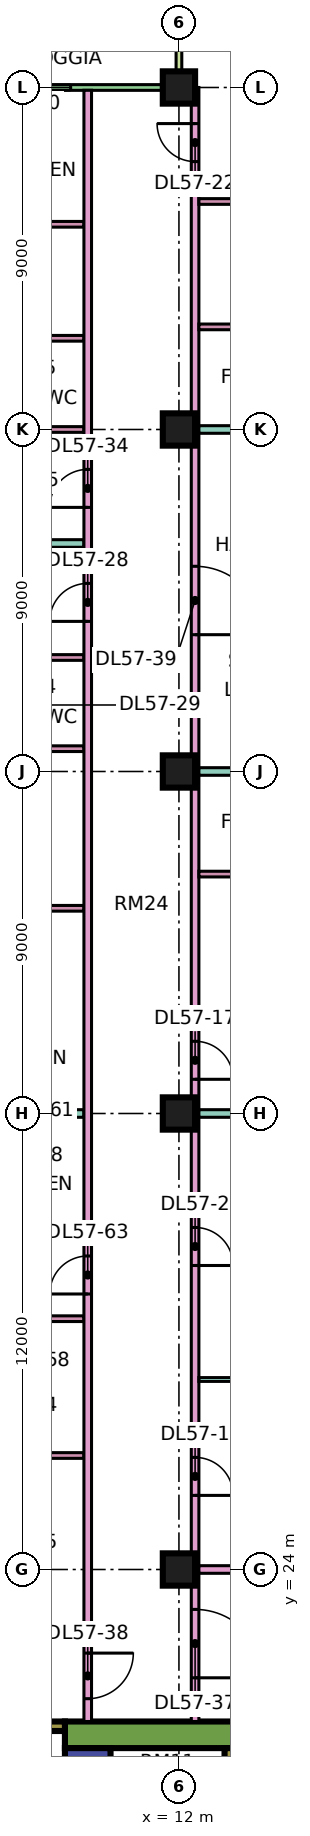
"""IFC4 building model, lengths in metres.
Left out: names, types, materials, properties, quantities, classifications, styles, units other than length and angle.
Written with IfcOpenShell. Run it as: python <this file> out.ifc"""

import sys

from ifc_helpers import new_model, si_unit, direction, frame, frame_2d, origin, origin_2d, place, context, subcontext, project, spatial, rectangle, extrude, element, fill, save


model = new_model("IFC4")
c1 = context("Model", 3, precision=1e-05, world=origin(), true_north=direction((0.0, 1.0)))
c2 = subcontext(c1, "Body", "Model", "MODEL_VIEW")
j1 = project(units=[si_unit("LENGTHUNIT", "METRE"), si_unit("PLANEANGLEUNIT", "RADIAN")], contexts=[c1])
p1 = place(None, origin())
s1 = spatial("IfcSite", under=j1, at=p1, CompositionType="ELEMENT")
p2 = place(p1, origin())
s2 = spatial("IfcBuilding", under=s1, at=p2, CompositionType="ELEMENT")
p3 = place(p2, frame((0.0, 0.0, 241.65)))
s3 = spatial("IfcBuildingStorey", under=s2, at=p3, CompositionType="ELEMENT", Elevation=241.65)
for number, where, z_axis, x_axis in (
    (1, (12.0, 24.0, 0.0), (0.0, 0.0, 1.0), (1.0, 0.0, 0.0)),
    (2, (12.0, 36.0, 0.0), (0.0, 0.0, 1.0), (1.0, 0.0, 0.0)),
    (3, (12.0, 45.0, 0.0), (0.0, 0.0, 1.0), (1.0, 0.0, 0.0)),
    (4, (12.0, 54.0, 0.0), (0.0, 0.0, 1.0), (1.0, 0.0, 0.0)),
    (5, (12.0, 63.0, 0.0), (0.0, 0.0, 1.0), (1.0, 0.0, 0.0)),
):
    element("IfcColumn", number, at=place(p3, frame(where, z_axis=z_axis, x_axis=x_axis)), inside=s3, PredefinedType="COLUMN", context=c2, shape_type="SweptSolid", body=[
        extrude(rectangle(XDim=0.85, YDim=0.85, at=origin_2d()), origin(), (0.0, 0.0, 1.0), 3.75),
    ])
p4 = place(p3, frame((9.0, 19.65, 0.0), z_axis=(0.0, 0.0, 1.0), x_axis=(1.0, 0.0, 0.0)))
e6 = element("IfcWall", 6, at=p4, inside=s3, PredefinedType="SHEAR", context=c2, shape_type="SweptSolid", body=[
    extrude(rectangle(XDim=25.0, YDim=0.7, at=frame_2d((12.5, 0.0))), origin(), (0.0, 0.0, 1.0), 3.75),
])
p5 = place(p4, frame((19.1, 0.0, 0.0)))
e7 = element("IfcOpeningElement", 7, at=p5, cuts=e6, PredefinedType="OPENING", context=c2, shape_type="SweptSolid", body=[
    extrude(rectangle(XDim=1.8, YDim=2.4, at=frame_2d((0.9, 1.2))), frame((0.0, 0.36, 0.0), z_axis=(0.0, -1.0, 0.0), x_axis=(1.0, 0.0, 0.0)), (0.0, 0.0, 1.0), 0.72),
])
p6 = place(p3, frame((9.6, 7.7, 0.0), z_axis=(0.0, 0.0, 1.0), x_axis=(0.0, 1.0, 0.0)))
e8 = element("IfcWall", 8, at=p6, inside=s3, PredefinedType="SHEAR", context=c2, shape_type="SweptSolid", body=[
    extrude(rectangle(XDim=11.6, YDim=1.2, at=frame_2d((5.8, 0.0))), origin(), (0.0, 0.0, 1.0), 3.75),
])
p7 = place(p6, frame((4.175, 0.0, 0.0)))
e9 = element("IfcOpeningElement", 9, at=p7, cuts=e8, PredefinedType="OPENING", context=c2, shape_type="SweptSolid", body=[
    extrude(rectangle(XDim=1.1, YDim=2.2, at=frame_2d((0.55, 1.1))), frame((0.0, 0.61, 0.0), z_axis=(0.0, -1.0, 0.0), x_axis=(1.0, 0.0, 0.0)), (0.0, 0.0, 1.0), 1.22),
])
p8 = place(p6, frame((6.675, 0.0, 0.0)))
e10 = element("IfcOpeningElement", 10, at=p8, cuts=e8, PredefinedType="OPENING", context=c2, shape_type="SweptSolid", body=[
    extrude(rectangle(XDim=1.1, YDim=2.2, at=frame_2d((0.55, 1.1))), frame((0.0, 0.61, 0.0), z_axis=(0.0, -1.0, 0.0), x_axis=(1.0, 0.0, 0.0)), (0.0, 0.0, 1.0), 1.22),
])
p9 = place(p6, frame((9.55, 0.0, 0.0)))
e11 = element("IfcOpeningElement", 11, at=p9, cuts=e8, PredefinedType="OPENING", context=c2, shape_type="SweptSolid", body=[
    extrude(rectangle(XDim=1.1, YDim=2.2, at=frame_2d((0.55, 1.1))), frame((0.0, 0.61, 0.0), z_axis=(0.0, -1.0, 0.0), x_axis=(1.0, 0.0, 0.0)), (0.0, 0.0, 1.0), 1.22),
])
p10 = place(p6, frame((1.85, 0.0, 0.0)))
e12 = element("IfcOpeningElement", 12, at=p10, cuts=e8, PredefinedType="OPENING", context=c2, shape_type="SweptSolid", body=[
    extrude(rectangle(XDim=0.9, YDim=2.1, at=frame_2d((0.45, 1.05))), frame((0.0, 0.61, 0.0), z_axis=(0.0, -1.0, 0.0), x_axis=(1.0, 0.0, 0.0)), (0.0, 0.0, 1.0), 1.22),
])
p11 = place(p3, frame((13.325, 7.7, 0.0), z_axis=(0.0, 0.0, 1.0), x_axis=(0.0, 1.0, 0.0)))
e13 = element("IfcWall", 13, at=p11, inside=s3, PredefinedType="SHEAR", context=c2, shape_type="SweptSolid", body=[
    extrude(rectangle(XDim=11.6, YDim=0.25, at=frame_2d((5.8, 0.0))), origin(), (0.0, 0.0, 1.0), 3.75),
])
p12 = place(p3, frame((2.1, 19.875, 0.0), z_axis=(0.0, 0.0, 1.0), x_axis=(1.0, 0.0, 0.0)))
e14 = element("IfcWall", 14, at=p12, inside=s3, PredefinedType="SHEAR", context=c2, shape_type="SweptSolid", body=[
    extrude(rectangle(XDim=6.9, YDim=0.25, at=frame_2d((3.45, 0.0))), origin(), (0.0, 0.0, 1.0), 3.75),
])
p13 = place(p12, frame((1.175, 0.0, 0.0)))
e15 = element("IfcOpeningElement", 15, at=p13, cuts=e14, PredefinedType="OPENING", context=c2, shape_type="SweptSolid", body=[
    extrude(rectangle(XDim=1.1, YDim=2.2, at=frame_2d((0.55, 1.1))), frame((0.0, 0.135, 0.0), z_axis=(0.0, -1.0, 0.0), x_axis=(1.0, 0.0, 0.0)), (0.0, 0.0, 1.0), 0.27),
])
p14 = place(p12, frame((4.6, 0.0, 0.0)))
e16 = element("IfcOpeningElement", 16, at=p14, cuts=e14, PredefinedType="OPENING", context=c2, shape_type="SweptSolid", body=[
    extrude(rectangle(XDim=1.2, YDim=2.2, at=frame_2d((0.6, 1.1))), frame((0.0, 0.135, 0.0), z_axis=(0.0, -1.0, 0.0), x_axis=(1.0, 0.0, 0.0)), (0.0, 0.0, 1.0), 0.27),
])
p15 = place(p3, frame((11.925, 63.0, 0.0), z_axis=(0.0, 0.0, 1.0), x_axis=(-1.0, 0.0, 0.0)))
e17 = element("IfcWall", 17, at=p15, inside=s3, PredefinedType="SOLIDWALL", context=c2, shape_type="SweptSolid", body=[
    extrude(rectangle(XDim=10.35, YDim=0.15, at=frame_2d((5.175, 0.0))), origin(), (0.0, 0.0, 1.0), 3.35),
])
p16 = place(p15, frame((2.775, 0.0, 0.45)))
e18 = element("IfcOpeningElement", 18, at=p16, cuts=e17, PredefinedType="OPENING", context=c2, shape_type="SweptSolid", body=[
    extrude(rectangle(XDim=2.4, YDim=2.4, at=frame_2d((1.2, 1.2))), frame((0.0, 0.085, 0.0), z_axis=(0.0, -1.0, 0.0), x_axis=(1.0, 0.0, 0.0)), (0.0, 0.0, 1.0), 0.17),
])
p17 = place(p15, frame((7.087, 0.0, 0.0)))
e19 = element("IfcOpeningElement", 19, at=p17, cuts=e17, PredefinedType="OPENING", context=c2, shape_type="SweptSolid", body=[
    extrude(rectangle(XDim=1.8, YDim=2.4, at=frame_2d((0.9, 1.2))), frame((0.0, 0.085, 0.0), z_axis=(0.0, -1.0, 0.0), x_axis=(1.0, 0.0, 0.0)), (0.0, 0.0, 1.0), 0.17),
])
p18 = place(p3, frame((12.0, 64.5, 0.0), z_axis=(0.0, 0.0, 1.0), x_axis=(0.0, -1.0, 0.0)))
e20 = element("IfcWall", 20, at=p18, inside=s3, PredefinedType="SOLIDWALL", context=c2, shape_type="SweptSolid", body=[
    extrude(rectangle(XDim=1.5, YDim=0.15, at=frame_2d((0.75, 0.0))), origin(), (0.0, 0.0, 1.0), 3.35),
])
p19 = place(p3, frame((-1.35, 22.4, 0.0), z_axis=(0.0, 0.0, 1.0), x_axis=(1.0, 0.0, 0.0)))
e21 = element("IfcWall", 21, at=p19, inside=s3, PredefinedType="PARTITIONING", context=c2, shape_type="SweptSolid", body=[
    extrude(rectangle(XDim=10.85, YDim=0.2, at=frame_2d((5.425, 0.0))), origin(), (0.0, 0.0, 1.0), 3.35),
])
p20 = place(p3, frame((0.074, 51.0, 0.0), z_axis=(0.0, 0.0, 1.0), x_axis=(1.0, 0.0, 0.0)))
e22 = element("IfcWall", 22, at=p20, inside=s3, PredefinedType="PARTITIONING", context=c2, shape_type="SweptSolid", body=[
    extrude(rectangle(XDim=9.426, YDim=0.2, at=frame_2d((4.713, 0.0))), origin(), (0.0, 0.0, 1.0), 3.35),
])
for number, where, z_axis, x_axis in (
    (23, (6.375, 41.4, 0.0), (0.0, 0.0, 1.0), (1.0, 0.0, 0.0)),
    (24, (6.375, 45.6, 0.0), (0.0, 0.0, 1.0), (1.0, 0.0, 0.0)),
    (25, (6.375, 48.0, 0.0), (0.0, 0.0, 1.0), (1.0, 0.0, 0.0)),
    (26, (6.375, 54.0, 0.0), (0.0, 0.0, 1.0), (1.0, 0.0, 0.0)),
    (27, (6.375, 56.4, 0.0), (0.0, 0.0, 1.0), (1.0, 0.0, 0.0)),
    (28, (6.375, 59.4, 0.0), (0.0, 0.0, 1.0), (1.0, 0.0, 0.0)),
):
    element("IfcWall", number, at=place(p3, frame(where, z_axis=z_axis, x_axis=x_axis)), inside=s3, PredefinedType="PARTITIONING", context=c2, shape_type="SweptSolid", body=[
        extrude(rectangle(XDim=3.125, YDim=0.15, at=frame_2d((1.562, 0.0))), origin(), (0.0, 0.0, 1.0), 3.35),
    ])
p21 = place(p3, frame((6.55, 36.0, 0.0), z_axis=(0.0, 0.0, 1.0), x_axis=(1.0, 0.0, 0.0)))
e29 = element("IfcWall", 29, at=p21, inside=s3, PredefinedType="PARTITIONING", context=c2, shape_type="SweptSolid", body=[
    extrude(rectangle(XDim=2.95, YDim=0.2, at=frame_2d((1.475, 0.0))), origin(), (0.0, 0.0, 1.0), 3.35),
])
p22 = place(p3, frame((6.65, 33.0, 0.0), z_axis=(0.0, 0.0, 1.0), x_axis=(1.0, 0.0, 0.0)))
e30 = element("IfcWall", 30, at=p22, inside=s3, PredefinedType="PARTITIONING", context=c2, shape_type="SweptSolid", body=[
    extrude(rectangle(XDim=2.85, YDim=0.1, at=frame_2d((1.425, 0.0))), origin(), (0.0, 0.0, 1.0), 3.35),
])
p23 = place(p3, frame((6.675, 27.0, 0.0), z_axis=(0.0, 0.0, 1.0), x_axis=(1.0, 0.0, 0.0)))
e31 = element("IfcWall", 31, at=p23, inside=s3, PredefinedType="PARTITIONING", context=c2, shape_type="SweptSolid", body=[
    extrude(rectangle(XDim=2.825, YDim=0.15, at=frame_2d((1.413, 0.0))), origin(), (0.0, 0.0, 1.0), 3.35),
])
p24 = place(p3, frame((6.675, 30.6, 0.0), z_axis=(0.0, 0.0, 1.0), x_axis=(1.0, 0.0, 0.0)))
e32 = element("IfcWall", 32, at=p24, inside=s3, PredefinedType="PARTITIONING", context=c2, shape_type="SweptSolid", body=[
    extrude(rectangle(XDim=2.825, YDim=0.15, at=frame_2d((1.413, 0.0))), origin(), (0.0, 0.0, 1.0), 3.35),
])
p25 = place(p24, frame((0.975, 0.0, 0.0)))
e33 = element("IfcOpeningElement", 33, at=p25, cuts=e32, PredefinedType="OPENING", context=c2, shape_type="SweptSolid", body=[
    extrude(rectangle(XDim=0.8, YDim=2.1, at=frame_2d((0.4, 1.05))), frame((0.0, 0.085, 0.0), z_axis=(0.0, -1.0, 0.0), x_axis=(1.0, 0.0, 0.0)), (0.0, 0.0, 1.0), 0.17),
])
p26 = place(p3, frame((9.6, 20.0, 0.0), z_axis=(0.0, 0.0, 1.0), x_axis=(0.0, 1.0, 0.0)))
e34 = element("IfcWall", 34, at=p26, inside=s3, PredefinedType="PARTITIONING", context=c2, shape_type="SweptSolid", body=[
    extrude(rectangle(XDim=42.926, YDim=0.2, at=frame_2d((21.463, 0.0))), origin(), (0.0, 0.0, 1.0), 3.35),
])
p27 = place(p26, frame((28.95, 0.0, 0.0)))
e35 = element("IfcOpeningElement", 35, at=p27, cuts=e34, PredefinedType="OPENING", context=c2, shape_type="SweptSolid", body=[
    extrude(rectangle(XDim=1.0, YDim=2.1, at=frame_2d((0.5, 1.05))), frame((0.0, 0.11, 0.0), z_axis=(0.0, -1.0, 0.0), x_axis=(1.0, 0.0, 0.0)), (0.0, 0.0, 1.0), 0.22),
])
p28 = place(p26, frame((31.95, 0.0, 0.0)))
e36 = element("IfcOpeningElement", 36, at=p28, cuts=e34, PredefinedType="OPENING", context=c2, shape_type="SweptSolid", body=[
    extrude(rectangle(XDim=1.0, YDim=2.1, at=frame_2d((0.5, 1.05))), frame((0.0, 0.11, 0.0), z_axis=(0.0, -1.0, 0.0), x_axis=(1.0, 0.0, 0.0)), (0.0, 0.0, 1.0), 0.22),
])
p29 = place(p26, frame((0.6, 0.0, 0.0)))
e37 = element("IfcOpeningElement", 37, at=p29, cuts=e34, PredefinedType="OPENING", context=c2, shape_type="SweptSolid", body=[
    extrude(rectangle(XDim=1.2, YDim=2.1, at=frame_2d((0.6, 1.05))), frame((0.0, 0.11, 0.0), z_axis=(0.0, -1.0, 0.0), x_axis=(1.0, 0.0, 0.0)), (0.0, 0.0, 1.0), 0.22),
])
p30 = place(p26, frame((11.25, 0.0, 0.0)))
e38 = element("IfcOpeningElement", 38, at=p30, cuts=e34, PredefinedType="OPENING", context=c2, shape_type="SweptSolid", body=[
    extrude(rectangle(XDim=1.0, YDim=2.1, at=frame_2d((0.5, 1.05))), frame((0.0, 0.11, 0.0), z_axis=(0.0, -1.0, 0.0), x_axis=(1.0, 0.0, 0.0)), (0.0, 0.0, 1.0), 0.22),
])
p31 = place(p3, frame((12.425, 20.0, 0.0), z_axis=(0.0, 0.0, 1.0), x_axis=(0.0, 1.0, 0.0)))
e39 = element("IfcWall", 39, at=p31, inside=s3, PredefinedType="PARTITIONING", context=c2, shape_type="SweptSolid", body=[
    extrude(rectangle(XDim=43.0, YDim=0.2, at=frame_2d((21.5, 0.0))), origin(), (0.0, 0.0, 1.0), 3.35),
])
p32 = place(p31, frame((5.95, 0.0, 0.0)))
e40 = element("IfcOpeningElement", 40, at=p32, cuts=e39, PredefinedType="OPENING", context=c2, shape_type="SweptSolid", body=[
    extrude(rectangle(XDim=1.0, YDim=2.1, at=frame_2d((0.5, 1.05))), frame((0.0, 0.11, 0.0), z_axis=(0.0, -1.0, 0.0), x_axis=(1.0, 0.0, 0.0)), (0.0, 0.0, 1.0), 0.22),
])
p33 = place(p31, frame((12.0, 0.0, 0.0)))
e41 = element("IfcOpeningElement", 41, at=p33, cuts=e39, PredefinedType="OPENING", context=c2, shape_type="SweptSolid", body=[
    extrude(rectangle(XDim=1.0, YDim=2.1, at=frame_2d((0.5, 1.05))), frame((0.0, 0.11, 0.0), z_axis=(0.0, -1.0, 0.0), x_axis=(1.0, 0.0, 0.0)), (0.0, 0.0, 1.0), 0.22),
])
p34 = place(p31, frame((16.9, 0.0, 0.0)))
e42 = element("IfcOpeningElement", 42, at=p34, cuts=e39, PredefinedType="OPENING", context=c2, shape_type="SweptSolid", body=[
    extrude(rectangle(XDim=1.0, YDim=2.1, at=frame_2d((0.5, 1.05))), frame((0.0, 0.11, 0.0), z_axis=(0.0, -1.0, 0.0), x_axis=(1.0, 0.0, 0.0)), (0.0, 0.0, 1.0), 0.22),
])
p35 = place(p31, frame((41.05, 0.0, 0.0)))
e43 = element("IfcOpeningElement", 43, at=p35, cuts=e39, PredefinedType="OPENING", context=c2, shape_type="SweptSolid", body=[
    extrude(rectangle(XDim=1.0, YDim=2.1, at=frame_2d((0.5, 1.05))), frame((0.0, 0.11, 0.0), z_axis=(0.0, -1.0, 0.0), x_axis=(1.0, 0.0, 0.0)), (0.0, 0.0, 1.0), 0.22),
])
p36 = place(p31, frame((1.15, 0.0, 0.0)))
e44 = element("IfcOpeningElement", 44, at=p36, cuts=e39, PredefinedType="OPENING", context=c2, shape_type="SweptSolid", body=[
    extrude(rectangle(XDim=1.8, YDim=2.1, at=frame_2d((0.9, 1.05))), frame((0.0, 0.11, 0.0), z_axis=(0.0, -1.0, 0.0), x_axis=(1.0, 0.0, 0.0)), (0.0, 0.0, 1.0), 0.22),
])
p37 = place(p31, frame((28.6, 0.0, 0.0)))
e45 = element("IfcOpeningElement", 45, at=p37, cuts=e39, PredefinedType="OPENING", context=c2, shape_type="SweptSolid", body=[
    extrude(rectangle(XDim=1.8, YDim=2.1, at=frame_2d((0.9, 1.05))), frame((0.0, 0.11, 0.0), z_axis=(0.0, -1.0, 0.0), x_axis=(1.0, 0.0, 0.0)), (0.0, 0.0, 1.0), 0.22),
])
p38 = place(p3, frame((12.525, 24.0, 0.0), z_axis=(0.0, 0.0, 1.0), x_axis=(1.0, 0.0, 0.0)))
e46 = element("IfcWall", 46, at=p38, inside=s3, PredefinedType="PARTITIONING", context=c2, shape_type="SweptSolid", body=[
    extrude(rectangle(XDim=8.975, YDim=0.2, at=frame_2d((4.488, 0.0))), origin(), (0.0, 0.0, 1.0), 3.35),
])
p39 = place(p3, frame((12.525, 29.0, 0.0), z_axis=(0.0, 0.0, 1.0), x_axis=(1.0, 0.0, 0.0)))
e47 = element("IfcWall", 47, at=p39, inside=s3, PredefinedType="PARTITIONING", context=c2, shape_type="SweptSolid", body=[
    extrude(rectangle(XDim=8.975, YDim=0.1, at=frame_2d((4.488, 0.0))), origin(), (0.0, 0.0, 1.0), 3.35),
])
p40 = place(p3, frame((12.525, 36.0, 0.0), z_axis=(0.0, 0.0, 1.0), x_axis=(1.0, 0.0, 0.0)))
e48 = element("IfcWall", 48, at=p40, inside=s3, PredefinedType="PARTITIONING", context=c2, shape_type="SweptSolid", body=[
    extrude(rectangle(XDim=11.475, YDim=0.2, at=frame_2d((5.738, 0.0))), origin(), (0.0, 0.0, 1.0), 3.35),
])
for number, where, z_axis, x_axis in (
    (49, (12.525, 38.7, 0.0), (0.0, 0.0, 1.0), (1.0, 0.0, 0.0)),
    (50, (12.525, 42.3, 0.0), (0.0, 0.0, 1.0), (1.0, 0.0, 0.0)),
):
    element("IfcWall", number, at=place(p3, frame(where, z_axis=z_axis, x_axis=x_axis)), inside=s3, PredefinedType="PARTITIONING", context=c2, shape_type="SweptSolid", body=[
        extrude(rectangle(XDim=5.225, YDim=0.15, at=frame_2d((2.613, 0.0))), origin(), (0.0, 0.0, 1.0), 3.35),
    ])
p41 = place(p3, frame((12.525, 45.0, 0.0), z_axis=(0.0, 0.0, 1.0), x_axis=(1.0, 0.0, 0.0)))
e51 = element("IfcWall", 51, at=p41, inside=s3, PredefinedType="PARTITIONING", context=c2, shape_type="SweptSolid", body=[
    extrude(rectangle(XDim=11.475, YDim=0.2, at=frame_2d((5.738, 0.0))), origin(), (0.0, 0.0, 1.0), 3.35),
])
p42 = place(p3, frame((12.525, 54.0, 0.0), z_axis=(0.0, 0.0, 1.0), x_axis=(1.0, 0.0, 0.0)))
e52 = element("IfcWall", 52, at=p42, inside=s3, PredefinedType="PARTITIONING", context=c2, shape_type="SweptSolid", body=[
    extrude(rectangle(XDim=11.401, YDim=0.2, at=frame_2d((5.701, 0.0))), origin(), (0.0, 0.0, 1.0), 3.35),
])
for number, where, z_axis, x_axis in (
    (53, (12.525, 56.7, 0.0), (0.0, 0.0, 1.0), (1.0, 0.0, 0.0)),
    (54, (12.525, 60.0, 0.0), (0.0, 0.0, 1.0), (1.0, 0.0, 0.0)),
):
    element("IfcWall", number, at=place(p3, frame(where, z_axis=z_axis, x_axis=x_axis)), inside=s3, PredefinedType="PARTITIONING", context=c2, shape_type="SweptSolid", body=[
        extrude(rectangle(XDim=5.225, YDim=0.15, at=frame_2d((2.613, 0.0))), origin(), (0.0, 0.0, 1.0), 3.35),
    ])
p43 = place(p16, origin())
e55 = element("IfcWindow", 55, at=p43, inside=s3, PartitioningType="SINGLE_PANEL", PredefinedType="WINDOW", context=c2, shape_type="SweptSolid", body=[
    extrude(rectangle(XDim=2.4, YDim=2.4, at=frame_2d((1.2, 1.2))), frame((0.0, 0.03, 0.0), z_axis=(0.0, -1.0, 0.0), x_axis=(1.0, 0.0, 0.0)), (0.0, 0.0, 1.0), 0.06),
])
fill(e18, e55)
p44 = place(p32, frame((1.0, 0.0, 0.0), z_axis=(0.0, 0.0, 1.0), x_axis=(-1.0, 0.0, 0.0)))
e56 = element("IfcDoor", 56, at=p44, inside=s3, OperationType="SINGLE_SWING_LEFT", PredefinedType="DOOR", context=c2, shape_type="SweptSolid", body=[
    extrude(rectangle(XDim=1.0, YDim=2.1, at=frame_2d((0.5, 1.05))), frame((0.0, 0.025, 0.0), z_axis=(0.0, -1.0, 0.0), x_axis=(1.0, 0.0, 0.0)), (0.0, 0.0, 1.0), 0.05),
])
fill(e40, e56)
p45 = place(p33, frame((1.0, 0.0, 0.0), z_axis=(0.0, 0.0, 1.0), x_axis=(-1.0, 0.0, 0.0)))
e57 = element("IfcDoor", 57, at=p45, inside=s3, OperationType="SINGLE_SWING_LEFT", PredefinedType="DOOR", context=c2, shape_type="SweptSolid", body=[
    extrude(rectangle(XDim=1.0, YDim=2.1, at=frame_2d((0.5, 1.05))), frame((0.0, 0.025, 0.0), z_axis=(0.0, -1.0, 0.0), x_axis=(1.0, 0.0, 0.0)), (0.0, 0.0, 1.0), 0.05),
])
fill(e41, e57)
p46 = place(p34, frame((1.0, 0.0, 0.0), z_axis=(0.0, 0.0, 1.0), x_axis=(-1.0, 0.0, 0.0)))
e58 = element("IfcDoor", 58, at=p46, inside=s3, OperationType="SINGLE_SWING_LEFT", PredefinedType="DOOR", context=c2, shape_type="SweptSolid", body=[
    extrude(rectangle(XDim=1.0, YDim=2.1, at=frame_2d((0.5, 1.05))), frame((0.0, 0.025, 0.0), z_axis=(0.0, -1.0, 0.0), x_axis=(1.0, 0.0, 0.0)), (0.0, 0.0, 1.0), 0.05),
])
fill(e42, e58)
p47 = place(p35, frame((1.0, 0.0, 0.0), z_axis=(0.0, 0.0, 1.0), x_axis=(-1.0, 0.0, 0.0)))
e59 = element("IfcDoor", 59, at=p47, inside=s3, OperationType="SINGLE_SWING_RIGHT", PredefinedType="DOOR", context=c2, shape_type="SweptSolid", body=[
    extrude(rectangle(XDim=1.0, YDim=2.1, at=frame_2d((0.5, 1.05))), frame((0.0, 0.025, 0.0), z_axis=(0.0, -1.0, 0.0), x_axis=(1.0, 0.0, 0.0)), (0.0, 0.0, 1.0), 0.05),
])
fill(e43, e59)
p48 = place(p27, origin())
e60 = element("IfcDoor", 60, at=p48, inside=s3, OperationType="SINGLE_SWING_LEFT", PredefinedType="DOOR", context=c2, shape_type="SweptSolid", body=[
    extrude(rectangle(XDim=1.0, YDim=2.1, at=frame_2d((0.5, 1.05))), frame((0.0, 0.025, 0.0), z_axis=(0.0, -1.0, 0.0), x_axis=(1.0, 0.0, 0.0)), (0.0, 0.0, 1.0), 0.05),
])
fill(e35, e60)
p49 = place(p28, origin())
e61 = element("IfcDoor", 61, at=p49, inside=s3, OperationType="SINGLE_SWING_LEFT", PredefinedType="DOOR", context=c2, shape_type="SweptSolid", body=[
    extrude(rectangle(XDim=1.0, YDim=2.1, at=frame_2d((0.5, 1.05))), frame((0.0, 0.025, 0.0), z_axis=(0.0, -1.0, 0.0), x_axis=(1.0, 0.0, 0.0)), (0.0, 0.0, 1.0), 0.05),
])
fill(e36, e61)
p50 = place(p36, frame((1.8, 0.0, 0.0), z_axis=(0.0, 0.0, 1.0), x_axis=(-1.0, 0.0, 0.0)))
e62 = element("IfcDoor", 62, at=p50, inside=s3, OperationType="DOUBLE_DOOR_SINGLE_SWING", PredefinedType="DOOR", context=c2, shape_type="SweptSolid", body=[
    extrude(rectangle(XDim=1.8, YDim=2.1, at=frame_2d((0.9, 1.05))), frame((0.0, 0.025, 0.0), z_axis=(0.0, -1.0, 0.0), x_axis=(1.0, 0.0, 0.0)), (0.0, 0.0, 1.0), 0.05),
])
fill(e44, e62)
p51 = place(p29, origin())
e63 = element("IfcDoor", 63, at=p51, inside=s3, OperationType="SINGLE_SWING_RIGHT", PredefinedType="DOOR", context=c2, shape_type="SweptSolid", body=[
    extrude(rectangle(XDim=1.2, YDim=2.1, at=frame_2d((0.6, 1.05))), frame((0.0, 0.025, 0.0), z_axis=(0.0, -1.0, 0.0), x_axis=(1.0, 0.0, 0.0)), (0.0, 0.0, 1.0), 0.05),
])
fill(e37, e63)
p52 = place(p37, frame((1.8, 0.0, 0.0), z_axis=(0.0, 0.0, 1.0), x_axis=(-1.0, 0.0, 0.0)))
e64 = element("IfcDoor", 64, at=p52, inside=s3, OperationType="DOUBLE_DOOR_SINGLE_SWING", PredefinedType="DOOR", context=c2, shape_type="SweptSolid", body=[
    extrude(rectangle(XDim=1.8, YDim=2.1, at=frame_2d((0.9, 1.05))), frame((0.0, 0.025, 0.0), z_axis=(0.0, -1.0, 0.0), x_axis=(1.0, 0.0, 0.0)), (0.0, 0.0, 1.0), 0.05),
])
fill(e45, e64)
p53 = place(p30, origin())
e65 = element("IfcDoor", 65, at=p53, inside=s3, OperationType="SINGLE_SWING_LEFT", PredefinedType="DOOR", context=c2, shape_type="SweptSolid", body=[
    extrude(rectangle(XDim=1.0, YDim=2.1, at=frame_2d((0.5, 1.05))), frame((0.0, 0.025, 0.0), z_axis=(0.0, -1.0, 0.0), x_axis=(1.0, 0.0, 0.0)), (0.0, 0.0, 1.0), 0.05),
])
fill(e38, e65)
save(model, sys.argv[1])
